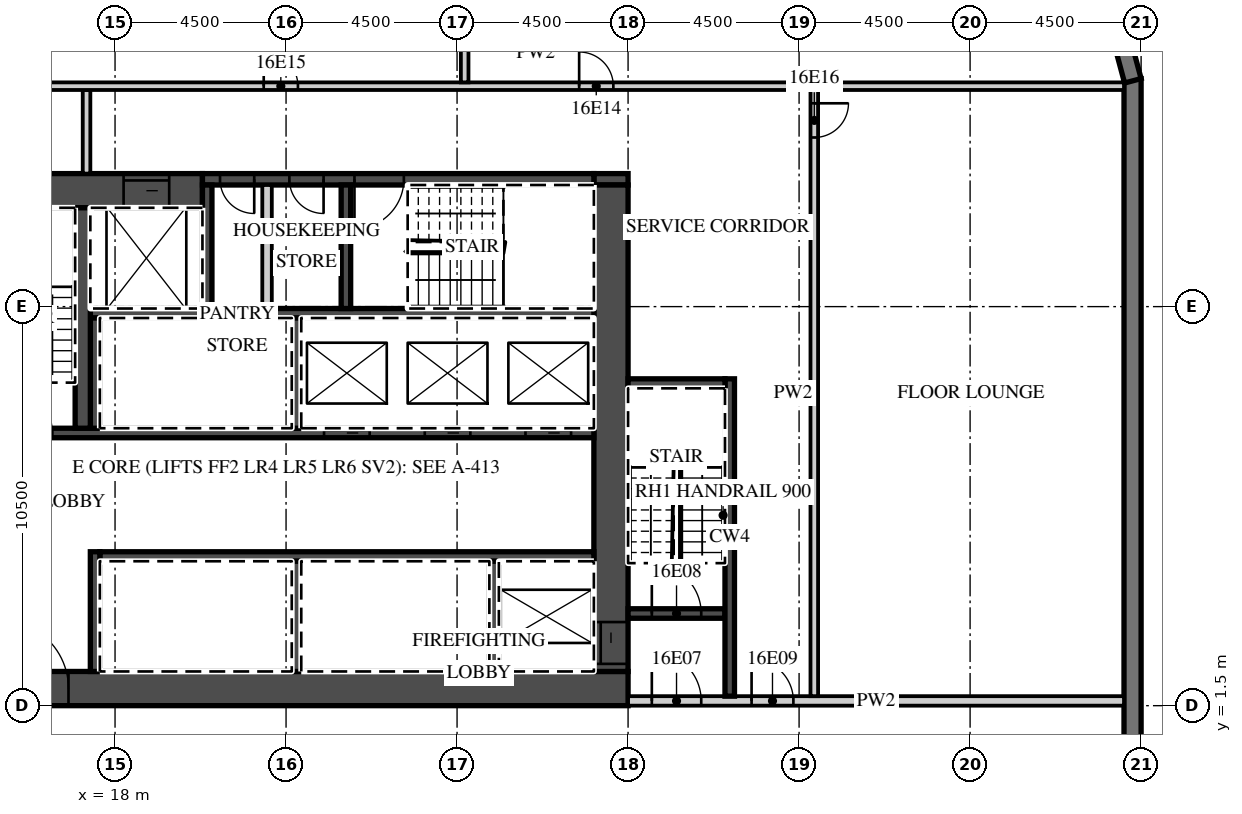
"""IFC4 building model, lengths in metres.
Left out: names, types, materials, properties, quantities, classifications, styles, units other than length and angle.
Written with IfcOpenShell. Run it as: python <this file> out.ifc"""

import sys

from ifc_helpers import new_model, si_unit, direction, frame, frame_2d, origin, place, context, subcontext, project, spatial, polyline, rectangle, outline, extrude, element, fill, save


model = new_model("IFC4")
c1 = context("Model", 3, precision=1e-05, world=origin(), true_north=direction((0.0, 1.0)))
c2 = subcontext(c1, "Body", "Model", "MODEL_VIEW")
j1 = project(units=[si_unit("LENGTHUNIT", "METRE"), si_unit("PLANEANGLEUNIT", "RADIAN")], contexts=[c1])
p1 = place(None, origin())
s1 = spatial("IfcSite", under=j1, at=p1, CompositionType="ELEMENT")
p2 = place(p1, origin())
s2 = spatial("IfcBuilding", under=s1, at=p2, CompositionType="ELEMENT")
p3 = place(p2, frame((0.0, 0.0, 83.1)))
s3 = spatial("IfcBuildingStorey", under=s2, at=p3, CompositionType="ELEMENT", Elevation=83.1)
p4 = place(p3, frame((44.775, -18.0, 0.0), z_axis=(0.0, 0.0, 1.0), x_axis=(0.0, 1.0, 0.0)))
e1 = element("IfcWall", 1, at=p4, inside=s3, PredefinedType="SOLIDWALL", context=c2, shape_type="SweptSolid", body=[
    extrude(rectangle(XDim=36.0, YDim=0.45, at=frame_2d((18.0, 0.0))), origin(), (0.0, 0.0, 1.0), 3.02),
])
p5 = place(p4, frame((3.9, 0.0, 0.45)))
e2 = element("IfcOpeningElement", 2, at=p5, cuts=e1, PredefinedType="OPENING", context=c2, shape_type="SweptSolid", body=[
    extrude(rectangle(XDim=3.3, YDim=2.25, at=frame_2d((1.65, 1.125))), frame((0.0, 0.235, 0.0), z_axis=(0.0, -1.0, 0.0), x_axis=(1.0, 0.0, 0.0)), (0.0, 0.0, 1.0), 0.47),
])
p6 = place(p4, frame((8.4, 0.0, 0.45)))
e3 = element("IfcOpeningElement", 3, at=p6, cuts=e1, PredefinedType="OPENING", context=c2, shape_type="SweptSolid", body=[
    extrude(rectangle(XDim=3.3, YDim=2.25, at=frame_2d((1.65, 1.125))), frame((0.0, 0.235, 0.0), z_axis=(0.0, -1.0, 0.0), x_axis=(1.0, 0.0, 0.0)), (0.0, 0.0, 1.0), 0.47),
])
p7 = place(p4, frame((12.9, 0.0, 0.45)))
e4 = element("IfcOpeningElement", 4, at=p7, cuts=e1, PredefinedType="OPENING", context=c2, shape_type="SweptSolid", body=[
    extrude(rectangle(XDim=3.3, YDim=2.25, at=frame_2d((1.65, 1.125))), frame((0.0, 0.235, 0.0), z_axis=(0.0, -1.0, 0.0), x_axis=(1.0, 0.0, 0.0)), (0.0, 0.0, 1.0), 0.47),
])
p8 = place(p3, frame((44.783, 17.942, 0.0), z_axis=(0.0, 0.0, 1.0), x_axis=(-0.25881466832, 0.965926999034, 0.0)))
e5 = element("IfcWall", 5, at=p8, inside=s3, PredefinedType="SOLIDWALL", context=c2, shape_type="SweptSolid", body=[
    extrude(outline(polyline([(0.0, -0.225), (2.071, -0.225), (1.95, 0.225), (0.121, 0.225), (0.0, -0.225)])), origin(), (0.0, 0.0, 1.0), 3.02),
])
p9 = place(p3, frame((13.5, 1.95, 0.0), z_axis=(0.0, 0.0, 1.0), x_axis=(1.0, 0.0, 0.0)))
e6 = element("IfcWall", 6, at=p9, inside=s3, PredefinedType="SHEAR", context=c2, shape_type="SweptSolid", body=[
    extrude(rectangle(XDim=18.0, YDim=0.9, at=frame_2d((9.0, 0.0))), origin(), (0.0, 0.0, 1.0), 3.02),
])
p10 = place(p9, frame((1.475, 0.0, 0.0)))
e7 = element("IfcOpeningElement", 7, at=p10, cuts=e6, PredefinedType="OPENING", context=c2, shape_type="SweptSolid", body=[
    extrude(rectangle(XDim=1.8, YDim=2.1, at=frame_2d((0.9, 1.05))), frame((0.0, 0.46, 0.0), z_axis=(0.0, -1.0, 0.0), x_axis=(1.0, 0.0, 0.0)), (0.0, 0.0, 1.0), 0.92),
])
p11 = place(p3, frame((13.5, 15.05, 0.0), z_axis=(0.0, 0.0, 1.0), x_axis=(1.0, 0.0, 0.0)))
e8 = element("IfcWall", 8, at=p11, inside=s3, PredefinedType="SHEAR", context=c2, shape_type="SweptSolid", body=[
    extrude(rectangle(XDim=6.8, YDim=0.9, at=frame_2d((3.4, 0.0))), origin(), (0.0, 0.0, 1.0), 3.02),
])
p12 = place(p11, frame((4.725, 0.0, 0.0)))
e9 = element("IfcOpeningElement", 9, at=p12, cuts=e8, PredefinedType="OPENING", context=c2, shape_type="SweptSolid", body=[
    extrude(rectangle(XDim=1.2, YDim=2.1, at=frame_2d((0.6, 1.05))), frame((0.0, 0.46, 0.0), z_axis=(0.0, -1.0, 0.0), x_axis=(1.0, 0.0, 0.0)), (0.0, 0.0, 1.0), 0.92),
])
p13 = place(p3, frame((30.6, 15.35, 0.0), z_axis=(0.0, 0.0, 1.0), x_axis=(1.0, 0.0, 0.0)))
e10 = element("IfcWall", 10, at=p13, inside=s3, PredefinedType="SHEAR", context=c2, shape_type="SweptSolid", body=[
    extrude(rectangle(XDim=0.9, YDim=0.3, at=frame_2d((0.45, 0.0))), origin(), (0.0, 0.0, 1.0), 3.02),
])
p14 = place(p3, frame((20.3, 15.35, 0.0), z_axis=(0.0, 0.0, 1.0), x_axis=(1.0, 0.0, 0.0)))
e11 = element("IfcWall", 11, at=p14, inside=s3, PredefinedType="SHEAR", context=c2, shape_type="SweptSolid", body=[
    extrude(rectangle(XDim=10.3, YDim=0.3, at=frame_2d((5.15, 0.0))), origin(), (0.0, 0.0, 1.0), 3.02),
])
p15 = place(p14, frame((4.0, 0.0, 0.0)))
e12 = element("IfcOpeningElement", 12, at=p15, cuts=e11, PredefinedType="OPENING", context=c2, shape_type="SweptSolid", body=[
    extrude(rectangle(XDim=1.3, YDim=2.1, at=frame_2d((0.65, 1.05))), frame((0.0, 0.16, 0.0), z_axis=(0.0, -1.0, 0.0), x_axis=(1.0, 0.0, 0.0)), (0.0, 0.0, 1.0), 0.32),
])
p16 = place(p14, frame((2.288, 0.0, 0.0)))
e13 = element("IfcOpeningElement", 13, at=p16, cuts=e11, PredefinedType="OPENING", context=c2, shape_type="SweptSolid", body=[
    extrude(rectangle(XDim=0.9, YDim=2.1, at=frame_2d((0.45, 1.05))), frame((0.0, 0.16, 0.0), z_axis=(0.0, -1.0, 0.0), x_axis=(1.0, 0.0, 0.0)), (0.0, 0.0, 1.0), 0.32),
])
p17 = place(p14, frame((0.462, 0.0, 0.0)))
e14 = element("IfcOpeningElement", 14, at=p17, cuts=e11, PredefinedType="OPENING", context=c2, shape_type="SweptSolid", body=[
    extrude(rectangle(XDim=0.9, YDim=2.1, at=frame_2d((0.45, 1.05))), frame((0.0, 0.16, 0.0), z_axis=(0.0, -1.0, 0.0), x_axis=(1.0, 0.0, 0.0)), (0.0, 0.0, 1.0), 0.32),
])
p18 = place(p3, frame((31.05, 2.4, 0.0), z_axis=(0.0, 0.0, 1.0), x_axis=(0.0, 1.0, 0.0)))
e15 = element("IfcWall", 15, at=p18, inside=s3, PredefinedType="SHEAR", context=c2, shape_type="SweptSolid", body=[
    extrude(rectangle(XDim=12.8, YDim=0.9, at=frame_2d((6.4, 0.0))), origin(), (0.0, 0.0, 1.0), 3.02),
])
p19 = place(p18, frame((0.2, 0.0, 0.0)))
e16 = element("IfcOpeningElement", 16, at=p19, cuts=e15, PredefinedType="OPENING", context=c2, shape_type="SweptSolid", body=[
    extrude(rectangle(XDim=1.1, YDim=2.1, at=frame_2d((0.55, 1.05))), frame((0.0, 0.46, 0.0), z_axis=(0.0, -1.0, 0.0), x_axis=(1.0, 0.0, 0.0)), (0.0, 0.0, 1.0), 0.92),
])
p20 = place(p3, frame((17.6, 5.425, 0.0), z_axis=(0.0, 0.0, 1.0), x_axis=(1.0, 0.0, 0.0)))
e17 = element("IfcWall", 17, at=p20, inside=s3, PredefinedType="SHEAR", context=c2, shape_type="SweptSolid", body=[
    extrude(rectangle(XDim=13.0, YDim=0.25, at=frame_2d((6.5, 0.0))), origin(), (0.0, 0.0, 1.0), 3.02),
])
p21 = place(p3, frame((17.475, 2.4, 0.0), z_axis=(0.0, 0.0, 1.0), x_axis=(0.0, 1.0, 0.0)))
e18 = element("IfcWall", 18, at=p21, inside=s3, PredefinedType="SHEAR", context=c2, shape_type="SweptSolid", body=[
    extrude(rectangle(XDim=3.15, YDim=0.25, at=frame_2d((1.575, 0.0))), origin(), (0.0, 0.0, 1.0), 3.02),
])
for number, where, z_axis, x_axis in (
    (19, (27.975, 2.4, 0.0), (0.0, 0.0, 1.0), (0.0, 1.0, 0.0)),
    (20, (22.775, 2.4, 0.0), (0.0, 0.0, 1.0), (0.0, 1.0, 0.0)),
):
    element("IfcWall", number, at=place(p3, frame(where, z_axis=z_axis, x_axis=x_axis)), inside=s3, PredefinedType="SHEAR", context=c2, shape_type="SweptSolid", body=[
        extrude(rectangle(XDim=2.9, YDim=0.25, at=frame_2d((1.45, 0.0))), origin(), (0.0, 0.0, 1.0), 3.02),
    ])
p22 = place(p3, frame((14.4, 8.675, 0.0), z_axis=(0.0, 0.0, 1.0), x_axis=(1.0, 0.0, 0.0)))
e21 = element("IfcWall", 21, at=p22, inside=s3, PredefinedType="SHEAR", context=c2, shape_type="SweptSolid", body=[
    extrude(rectangle(XDim=16.2, YDim=0.25, at=frame_2d((8.1, 0.0))), origin(), (0.0, 0.0, 1.0), 3.02),
])
p23 = place(p22, frame((14.4, 0.0, 0.0)))
e22 = element("IfcOpeningElement", 22, at=p23, cuts=e21, PredefinedType="OPENING", context=c2, shape_type="SweptSolid", body=[
    extrude(rectangle(XDim=1.2, YDim=2.1, at=frame_2d((0.6, 1.05))), frame((0.0, 0.135, 0.0), z_axis=(0.0, -1.0, 0.0), x_axis=(1.0, 0.0, 0.0)), (0.0, 0.0, 1.0), 0.27),
])
p24 = place(p22, frame((11.75, 0.0, 0.0)))
e23 = element("IfcOpeningElement", 23, at=p24, cuts=e21, PredefinedType="OPENING", context=c2, shape_type="SweptSolid", body=[
    extrude(rectangle(XDim=1.2, YDim=2.1, at=frame_2d((0.6, 1.05))), frame((0.0, 0.135, 0.0), z_axis=(0.0, -1.0, 0.0), x_axis=(1.0, 0.0, 0.0)), (0.0, 0.0, 1.0), 0.27),
])
p25 = place(p22, frame((9.1, 0.0, 0.0)))
e24 = element("IfcOpeningElement", 24, at=p25, cuts=e21, PredefinedType="OPENING", context=c2, shape_type="SweptSolid", body=[
    extrude(rectangle(XDim=1.2, YDim=2.1, at=frame_2d((0.6, 1.05))), frame((0.0, 0.135, 0.0), z_axis=(0.0, -1.0, 0.0), x_axis=(1.0, 0.0, 0.0)), (0.0, 0.0, 1.0), 0.27),
])
p26 = place(p22, frame((0.65, 0.0, 0.0)))
e25 = element("IfcOpeningElement", 25, at=p26, cuts=e21, PredefinedType="OPENING", context=c2, shape_type="SweptSolid", body=[
    extrude(rectangle(XDim=1.3, YDim=2.1, at=frame_2d((0.65, 1.05))), frame((0.0, 0.135, 0.0), z_axis=(0.0, -1.0, 0.0), x_axis=(1.0, 0.0, 0.0)), (0.0, 0.0, 1.0), 0.27),
])
p27 = place(p3, frame((17.35, 11.825, 0.0), z_axis=(0.0, 0.0, 1.0), x_axis=(1.0, 0.0, 0.0)))
e26 = element("IfcWall", 26, at=p27, inside=s3, PredefinedType="SHEAR", context=c2, shape_type="SweptSolid", body=[
    extrude(rectangle(XDim=13.25, YDim=0.25, at=frame_2d((6.625, 0.0))), origin(), (0.0, 0.0, 1.0), 3.02),
])
for number, where, z_axis, x_axis in (
    (27, (17.475, 8.8, 0.0), (0.0, 0.0, 1.0), (0.0, 1.0, 0.0)),
    (28, (22.775, 8.8, 0.0), (0.0, 0.0, 1.0), (0.0, 1.0, 0.0)),
):
    element("IfcWall", number, at=place(p3, frame(where, z_axis=z_axis, x_axis=x_axis)), inside=s3, PredefinedType="SHEAR", context=c2, shape_type="SweptSolid", body=[
        extrude(rectangle(XDim=2.9, YDim=0.25, at=frame_2d((1.45, 0.0))), origin(), (0.0, 0.0, 1.0), 3.02),
    ])
p28 = place(p3, frame((17.15, 8.8, 0.0), z_axis=(0.0, 0.0, 1.0), x_axis=(0.0, 1.0, 0.0)))
e29 = element("IfcWall", 29, at=p28, inside=s3, PredefinedType="SHEAR", context=c2, shape_type="SweptSolid", body=[
    extrude(rectangle(XDim=5.8, YDim=0.4, at=frame_2d((2.9, 0.0))), origin(), (0.0, 0.0, 1.0), 3.02),
])
for number, where, z_axis, x_axis in (
    (30, (20.425, 11.95, 0.0), (0.0, 0.0, 1.0), (0.0, 1.0, 0.0)),
    (31, (24.075, 11.95, 0.0), (0.0, 0.0, 1.0), (0.0, 1.0, 0.0)),
):
    element("IfcWall", number, at=place(p3, frame(where, z_axis=z_axis, x_axis=x_axis)), inside=s3, PredefinedType="SHEAR", context=c2, shape_type="SweptSolid", body=[
        extrude(rectangle(XDim=3.25, YDim=0.25, at=frame_2d((1.625, 0.0))), origin(), (0.0, 0.0, 1.0), 3.02),
    ])
p29 = place(p3, frame((22.0, 11.95, 0.0), z_axis=(0.0, 0.0, 1.0), x_axis=(0.0, 1.0, 0.0)))
e32 = element("IfcWall", 32, at=p29, inside=s3, PredefinedType="PARTITIONING", context=c2, shape_type="SweptSolid", body=[
    extrude(rectangle(XDim=3.25, YDim=0.25, at=frame_2d((1.625, 0.0))), origin(), (0.0, 0.0, 1.0), 3.02),
])
p30 = place(p3, frame((31.5, 1.625, 0.0), z_axis=(0.0, 0.0, 1.0), x_axis=(1.0, 0.0, 0.0)))
e33 = element("IfcWall", 33, at=p30, inside=s3, PredefinedType="PARTITIONING", context=c2, shape_type="SweptSolid", body=[
    extrude(rectangle(XDim=13.05, YDim=0.25, at=frame_2d((6.525, 0.0))), origin(), (0.0, 0.0, 1.0), 3.02),
])
p31 = place(p30, frame((0.625, 0.0, 0.0)))
e34 = element("IfcOpeningElement", 34, at=p31, cuts=e33, PredefinedType="OPENING", context=c2, shape_type="SweptSolid", body=[
    extrude(rectangle(XDim=1.3, YDim=2.1, at=frame_2d((0.65, 1.05))), frame((0.0, 0.135, 0.0), z_axis=(0.0, -1.0, 0.0), x_axis=(1.0, 0.0, 0.0)), (0.0, 0.0, 1.0), 0.27),
])
p32 = place(p30, frame((3.25, 0.0, 0.0)))
e35 = element("IfcOpeningElement", 35, at=p32, cuts=e33, PredefinedType="OPENING", context=c2, shape_type="SweptSolid", body=[
    extrude(rectangle(XDim=1.1, YDim=2.1, at=frame_2d((0.55, 1.05))), frame((0.0, 0.135, 0.0), z_axis=(0.0, -1.0, 0.0), x_axis=(1.0, 0.0, 0.0)), (0.0, 0.0, 1.0), 0.27),
])
p33 = place(p3, frame((31.5, 3.925, 0.0), z_axis=(0.0, 0.0, 1.0), x_axis=(1.0, 0.0, 0.0)))
e36 = element("IfcWall", 36, at=p33, inside=s3, PredefinedType="SHEAR", context=c2, shape_type="SweptSolid", body=[
    extrude(rectangle(XDim=2.55, YDim=0.25, at=frame_2d((1.275, 0.0))), origin(), (0.0, 0.0, 1.0), 3.02),
])
p34 = place(p33, frame((0.625, 0.0, 0.0)))
e37 = element("IfcOpeningElement", 37, at=p34, cuts=e36, PredefinedType="OPENING", context=c2, shape_type="SweptSolid", body=[
    extrude(rectangle(XDim=1.3, YDim=2.1, at=frame_2d((0.65, 1.05))), frame((0.0, 0.135, 0.0), z_axis=(0.0, -1.0, 0.0), x_axis=(1.0, 0.0, 0.0)), (0.0, 0.0, 1.0), 0.27),
])
p35 = place(p3, frame((34.175, 1.75, 0.0), z_axis=(0.0, 0.0, 1.0), x_axis=(0.0, 1.0, 0.0)))
e38 = element("IfcWall", 38, at=p35, inside=s3, PredefinedType="SHEAR", context=c2, shape_type="SweptSolid", body=[
    extrude(rectangle(XDim=8.35, YDim=0.25, at=frame_2d((4.175, 0.0))), origin(), (0.0, 0.0, 1.0), 3.02),
])
p36 = place(p3, frame((31.5, 9.975, 0.0), z_axis=(0.0, 0.0, 1.0), x_axis=(1.0, 0.0, 0.0)))
e39 = element("IfcWall", 39, at=p36, inside=s3, PredefinedType="SHEAR", context=c2, shape_type="SweptSolid", body=[
    extrude(rectangle(XDim=2.55, YDim=0.25, at=frame_2d((1.275, 0.0))), origin(), (0.0, 0.0, 1.0), 3.02),
])
p37 = place(p3, frame((17.25, 15.5, 0.0), z_axis=(0.0, 0.0, 1.0), x_axis=(0.0, 1.0, 0.0)))
e40 = element("IfcWall", 40, at=p37, inside=s3, PredefinedType="PARTITIONING", context=c2, shape_type="SweptSolid", body=[
    extrude(rectangle(XDim=2.2, YDim=0.2, at=frame_2d((1.1, 0.0))), origin(), (0.0, 0.0, 1.0), 3.02),
])
p38 = place(p3, frame((36.4, 1.75, 0.0), z_axis=(0.0, 0.0, 1.0), x_axis=(0.0, 1.0, 0.0)))
e41 = element("IfcWall", 41, at=p38, inside=s3, PredefinedType="PARTITIONING", context=c2, shape_type="SweptSolid", body=[
    extrude(rectangle(XDim=15.95, YDim=0.2, at=frame_2d((7.975, 0.0))), origin(), (0.0, 0.0, 1.0), 3.02),
])
p39 = place(p38, frame((14.7, 0.0, 0.0)))
e42 = element("IfcOpeningElement", 42, at=p39, cuts=e41, PredefinedType="OPENING", context=c2, shape_type="SweptSolid", body=[
    extrude(rectangle(XDim=0.9, YDim=2.1, at=frame_2d((0.45, 1.05))), frame((0.0, 0.11, 0.0), z_axis=(0.0, -1.0, 0.0), x_axis=(1.0, 0.0, 0.0)), (0.0, 0.0, 1.0), 0.22),
])
p40 = place(p3, frame((13.6, 17.8, 0.0), z_axis=(0.0, 0.0, 1.0), x_axis=(1.0, 0.0, 0.0)))
e43 = element("IfcWall", 43, at=p40, inside=s3, PredefinedType="PARTITIONING", context=c2, shape_type="SweptSolid", body=[
    extrude(rectangle(XDim=30.95, YDim=0.2, at=frame_2d((15.475, 0.0))), origin(), (0.0, 0.0, 1.0), 3.02),
])
p41 = place(p40, frame((16.613, 0.0, 0.0)))
e44 = element("IfcOpeningElement", 44, at=p41, cuts=e43, PredefinedType="OPENING", context=c2, shape_type="SweptSolid", body=[
    extrude(rectangle(XDim=0.9, YDim=2.1, at=frame_2d((0.45, 1.05))), frame((0.0, 0.11, 0.0), z_axis=(0.0, -1.0, 0.0), x_axis=(1.0, 0.0, 0.0)), (0.0, 0.0, 1.0), 0.22),
])
p42 = place(p40, frame((8.312, 0.0, 0.0)))
e45 = element("IfcOpeningElement", 45, at=p42, cuts=e43, PredefinedType="OPENING", context=c2, shape_type="SweptSolid", body=[
    extrude(rectangle(XDim=0.9, YDim=2.1, at=frame_2d((0.45, 1.05))), frame((0.0, 0.11, 0.0), z_axis=(0.0, -1.0, 0.0), x_axis=(1.0, 0.0, 0.0)), (0.0, 0.0, 1.0), 0.22),
])
p43 = place(p3, frame((27.2, 17.9, 0.0), z_axis=(0.0, 0.0, 1.0), x_axis=(0.0, 1.0, 0.0)))
e46 = element("IfcWall", 46, at=p43, inside=s3, PredefinedType="PARTITIONING", context=c2, shape_type="SweptSolid", body=[
    extrude(rectangle(XDim=3.65, YDim=0.2, at=frame_2d((1.825, 0.0))), origin(), (0.0, 0.0, 1.0), 3.02),
])
p44 = place(p23, origin())
e47 = element("IfcDoor", 47, at=p44, inside=s3, OperationType="SLIDING_TO_LEFT", PredefinedType="DOOR", context=c2, shape_type="SweptSolid", body=[
    extrude(rectangle(XDim=1.2, YDim=2.1, at=frame_2d((0.6, 1.05))), frame((0.0, 0.025, 0.0), z_axis=(0.0, -1.0, 0.0), x_axis=(1.0, 0.0, 0.0)), (0.0, 0.0, 1.0), 0.05),
])
fill(e22, e47)
p45 = place(p24, origin())
e48 = element("IfcDoor", 48, at=p45, inside=s3, OperationType="SLIDING_TO_RIGHT", PredefinedType="DOOR", context=c2, shape_type="SweptSolid", body=[
    extrude(rectangle(XDim=1.2, YDim=2.1, at=frame_2d((0.6, 1.05))), frame((0.0, 0.025, 0.0), z_axis=(0.0, -1.0, 0.0), x_axis=(1.0, 0.0, 0.0)), (0.0, 0.0, 1.0), 0.05),
])
fill(e23, e48)
p46 = place(p25, origin())
e49 = element("IfcDoor", 49, at=p46, inside=s3, OperationType="SLIDING_TO_RIGHT", PredefinedType="DOOR", context=c2, shape_type="SweptSolid", body=[
    extrude(rectangle(XDim=1.2, YDim=2.1, at=frame_2d((0.6, 1.05))), frame((0.0, 0.025, 0.0), z_axis=(0.0, -1.0, 0.0), x_axis=(1.0, 0.0, 0.0)), (0.0, 0.0, 1.0), 0.05),
])
fill(e24, e49)
p47 = place(p12, origin())
e50 = element("IfcDoor", 50, at=p47, inside=s3, OperationType="SLIDING_TO_LEFT", PredefinedType="DOOR", context=c2, shape_type="SweptSolid", body=[
    extrude(rectangle(XDim=1.2, YDim=2.1, at=frame_2d((0.6, 1.05))), frame((0.0, 0.025, 0.0), z_axis=(0.0, -1.0, 0.0), x_axis=(1.0, 0.0, 0.0)), (0.0, 0.0, 1.0), 0.05),
])
fill(e9, e50)
p48 = place(p19, origin())
e51 = element("IfcDoor", 51, at=p48, inside=s3, OperationType="SLIDING_TO_LEFT", PredefinedType="DOOR", context=c2, shape_type="SweptSolid", body=[
    extrude(rectangle(XDim=1.1, YDim=2.1, at=frame_2d((0.55, 1.05))), frame((0.0, 0.025, 0.0), z_axis=(0.0, -1.0, 0.0), x_axis=(1.0, 0.0, 0.0)), (0.0, 0.0, 1.0), 0.05),
])
fill(e16, e51)
p49 = place(p10, origin())
e52 = element("IfcDoor", 52, at=p49, inside=s3, OperationType="DOUBLE_DOOR_DOUBLE_SWING", PredefinedType="DOOR", context=c2, shape_type="SweptSolid", body=[
    extrude(rectangle(XDim=1.8, YDim=2.1, at=frame_2d((0.9, 1.05))), frame((0.0, 0.025, 0.0), z_axis=(0.0, -1.0, 0.0), x_axis=(1.0, 0.0, 0.0)), (0.0, 0.0, 1.0), 0.05),
])
fill(e7, e52)
p50 = place(p31, origin())
e53 = element("IfcDoor", 53, at=p50, inside=s3, OperationType="SINGLE_SWING_LEFT", PredefinedType="DOOR", context=c2, shape_type="SweptSolid", body=[
    extrude(rectangle(XDim=1.3, YDim=2.1, at=frame_2d((0.65, 1.05))), frame((0.0, 0.025, 0.0), z_axis=(0.0, -1.0, 0.0), x_axis=(1.0, 0.0, 0.0)), (0.0, 0.0, 1.0), 0.05),
])
fill(e34, e53)
p51 = place(p34, origin())
e54 = element("IfcDoor", 54, at=p51, inside=s3, OperationType="SINGLE_SWING_LEFT", PredefinedType="DOOR", context=c2, shape_type="SweptSolid", body=[
    extrude(rectangle(XDim=1.3, YDim=2.1, at=frame_2d((0.65, 1.05))), frame((0.0, 0.025, 0.0), z_axis=(0.0, -1.0, 0.0), x_axis=(1.0, 0.0, 0.0)), (0.0, 0.0, 1.0), 0.05),
])
fill(e37, e54)
p52 = place(p32, origin())
e55 = element("IfcDoor", 55, at=p52, inside=s3, OperationType="SINGLE_SWING_LEFT", PredefinedType="DOOR", context=c2, shape_type="SweptSolid", body=[
    extrude(rectangle(XDim=1.1, YDim=2.1, at=frame_2d((0.55, 1.05))), frame((0.0, 0.025, 0.0), z_axis=(0.0, -1.0, 0.0), x_axis=(1.0, 0.0, 0.0)), (0.0, 0.0, 1.0), 0.05),
])
fill(e35, e55)
p53 = place(p15, origin())
e56 = element("IfcDoor", 56, at=p53, inside=s3, OperationType="SINGLE_SWING_LEFT", PredefinedType="DOOR", context=c2, shape_type="SweptSolid", body=[
    extrude(rectangle(XDim=1.3, YDim=2.1, at=frame_2d((0.65, 1.05))), frame((0.0, 0.025, 0.0), z_axis=(0.0, -1.0, 0.0), x_axis=(1.0, 0.0, 0.0)), (0.0, 0.0, 1.0), 0.05),
])
fill(e12, e56)
p54 = place(p16, origin())
e57 = element("IfcDoor", 57, at=p54, inside=s3, OperationType="SINGLE_SWING_RIGHT", PredefinedType="DOOR", context=c2, shape_type="SweptSolid", body=[
    extrude(rectangle(XDim=0.9, YDim=2.1, at=frame_2d((0.45, 1.05))), frame((0.0, 0.025, 0.0), z_axis=(0.0, -1.0, 0.0), x_axis=(1.0, 0.0, 0.0)), (0.0, 0.0, 1.0), 0.05),
])
fill(e13, e57)
p55 = place(p17, origin())
e58 = element("IfcDoor", 58, at=p55, inside=s3, OperationType="SINGLE_SWING_RIGHT", PredefinedType="DOOR", context=c2, shape_type="SweptSolid", body=[
    extrude(rectangle(XDim=0.9, YDim=2.1, at=frame_2d((0.45, 1.05))), frame((0.0, 0.025, 0.0), z_axis=(0.0, -1.0, 0.0), x_axis=(1.0, 0.0, 0.0)), (0.0, 0.0, 1.0), 0.05),
])
fill(e14, e58)
p56 = place(p41, origin())
e59 = element("IfcDoor", 59, at=p56, inside=s3, OperationType="SINGLE_SWING_LEFT", PredefinedType="DOOR", context=c2, shape_type="SweptSolid", body=[
    extrude(rectangle(XDim=0.9, YDim=2.1, at=frame_2d((0.45, 1.05))), frame((0.0, 0.025, 0.0), z_axis=(0.0, -1.0, 0.0), x_axis=(1.0, 0.0, 0.0)), (0.0, 0.0, 1.0), 0.05),
])
fill(e44, e59)
p57 = place(p42, origin())
e60 = element("IfcDoor", 60, at=p57, inside=s3, OperationType="SINGLE_SWING_LEFT", PredefinedType="DOOR", context=c2, shape_type="SweptSolid", body=[
    extrude(rectangle(XDim=0.9, YDim=2.1, at=frame_2d((0.45, 1.05))), frame((0.0, 0.025, 0.0), z_axis=(0.0, -1.0, 0.0), x_axis=(1.0, 0.0, 0.0)), (0.0, 0.0, 1.0), 0.05),
])
fill(e45, e60)
p58 = place(p39, origin())
e61 = element("IfcDoor", 61, at=p58, inside=s3, OperationType="SINGLE_SWING_RIGHT", PredefinedType="DOOR", context=c2, shape_type="SweptSolid", body=[
    extrude(rectangle(XDim=0.9, YDim=2.1, at=frame_2d((0.45, 1.05))), frame((0.0, 0.025, 0.0), z_axis=(0.0, -1.0, 0.0), x_axis=(1.0, 0.0, 0.0)), (0.0, 0.0, 1.0), 0.05),
])
fill(e42, e61)
save(model, sys.argv[1])
